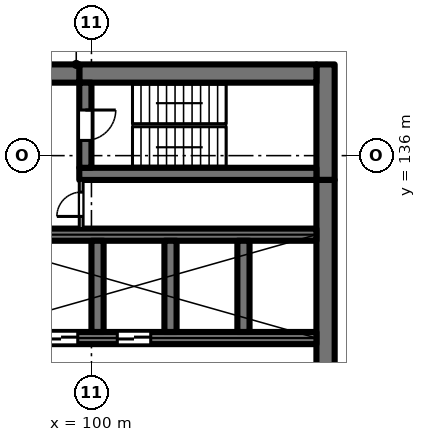
"""IFC4 building model, lengths in metres.
Left out: names, types, materials, properties, quantities, classifications, styles, units other than length and angle.
Written with IfcOpenShell. Run it as: python <this file> out.ifc"""

import sys

from ifc_helpers import new_model, si_unit, direction, frame, frame_2d, origin, place, context, subcontext, project, spatial, rectangle, extrude, element, fill, save


model = new_model("IFC4")
c1 = context("Model", 3, precision=1e-05, world=origin(), true_north=direction((0.0, 1.0)))
c2 = subcontext(c1, "Body", "Model", "MODEL_VIEW")
j1 = project(units=[si_unit("LENGTHUNIT", "METRE"), si_unit("PLANEANGLEUNIT", "RADIAN")], contexts=[c1])
p1 = place(None, origin())
s1 = spatial("IfcSite", under=j1, at=p1, CompositionType="ELEMENT")
p2 = place(p1, origin())
s2 = spatial("IfcBuilding", under=s1, at=p2, CompositionType="ELEMENT")
p3 = place(p2, frame((0.0, 0.0, 43.5)))
s3 = spatial("IfcBuildingStorey", under=s2, at=p3, CompositionType="ELEMENT", Elevation=43.5)
p4 = place(p3, frame((107.7, 139.0, 0.0), z_axis=(0.0, 0.0, 1.0), x_axis=(0.0, -1.0, 0.0)))
e1 = element("IfcWall", 1, at=p4, inside=s3, PredefinedType="SHEAR", context=c2, shape_type="SweptSolid", body=[
    extrude(rectangle(XDim=3.8, YDim=0.6, at=frame_2d((1.9, 0.0))), origin(), (0.0, 0.0, 1.0), 4.0),
])
p5 = place(p3, frame((107.7, 135.2, 0.0), z_axis=(0.0, 0.0, 1.0), x_axis=(0.0, -1.0, 0.0)))
e2 = element("IfcWall", 2, at=p5, inside=s3, PredefinedType="SHEAR", context=c2, shape_type="SweptSolid", body=[
    extrude(rectangle(XDim=14.4, YDim=0.6, at=frame_2d((7.2, 0.0))), origin(), (0.0, 0.0, 1.0), 4.0),
])
p6 = place(p3, frame((107.4, 138.7, 0.0), z_axis=(0.0, 0.0, 1.0), x_axis=(-1.0, 0.0, 0.0)))
e3 = element("IfcWall", 3, at=p6, inside=s3, PredefinedType="SHEAR", context=c2, shape_type="SweptSolid", body=[
    extrude(rectangle(XDim=7.8, YDim=0.6, at=frame_2d((3.9, 0.0))), origin(), (0.0, 0.0, 1.0), 4.0),
])
p7 = place(p3, frame((99.6, 138.7, 0.0), z_axis=(0.0, 0.0, 1.0), x_axis=(-1.0, 0.0, 0.0)))
e4 = element("IfcWall", 4, at=p7, inside=s3, PredefinedType="SHEAR", context=c2, shape_type="SweptSolid", body=[
    extrude(rectangle(XDim=8.9, YDim=0.6, at=frame_2d((4.45, 0.0))), origin(), (0.0, 0.0, 1.0), 4.0),
])
p8 = place(p3, frame((107.4, 135.4, 0.0), z_axis=(0.0, 0.0, 1.0), x_axis=(-1.0, 0.0, 0.0)))
e5 = element("IfcWall", 5, at=p8, inside=s3, PredefinedType="SHEAR", context=c2, shape_type="SweptSolid", body=[
    extrude(rectangle(XDim=7.8, YDim=0.4, at=frame_2d((3.9, 0.0))), origin(), (0.0, 0.0, 1.0), 4.0),
])
p9 = place(p3, frame((99.8, 138.4, 0.0), z_axis=(0.0, 0.0, 1.0), x_axis=(0.0, -1.0, 0.0)))
e6 = element("IfcWall", 6, at=p9, inside=s3, PredefinedType="SHEAR", context=c2, shape_type="SweptSolid", body=[
    extrude(rectangle(XDim=2.8, YDim=0.4, at=frame_2d((1.4, 0.0))), origin(), (0.0, 0.0, 1.0), 4.0),
])
p10 = place(p9, frame((0.9, 0.0, 0.0)))
e7 = element("IfcOpeningElement", 7, at=p10, cuts=e6, PredefinedType="OPENING", context=c2, shape_type="SweptSolid", body=[
    extrude(rectangle(XDim=1.0, YDim=2.1, at=frame_2d((0.5, 1.05))), frame((0.0, 0.21, 0.0), z_axis=(0.0, -1.0, 0.0), x_axis=(1.0, 0.0, 0.0)), (0.0, 0.0, 1.0), 0.42),
])
p11 = place(p3, frame((107.4, 130.0, 0.0), z_axis=(0.0, 0.0, 1.0), x_axis=(-1.0, 0.0, 0.0)))
e8 = element("IfcWall", 8, at=p11, inside=s3, PredefinedType="SHEAR", context=c2, shape_type="SweptSolid", body=[
    extrude(rectangle(XDim=12.2, YDim=0.4, at=frame_2d((6.1, 0.0))), origin(), (0.0, 0.0, 1.0), 4.0),
])
p12 = place(p11, frame((5.45, 0.0, 0.0)))
e9 = element("IfcOpeningElement", 9, at=p12, cuts=e8, PredefinedType="OPENING", context=c2, shape_type="SweptSolid", body=[
    extrude(rectangle(XDim=1.1, YDim=2.1, at=frame_2d((0.55, 1.05))), frame((0.0, 0.21, 0.0), z_axis=(0.0, -1.0, 0.0), x_axis=(1.0, 0.0, 0.0)), (0.0, 0.0, 1.0), 0.42),
])
p13 = place(p11, frame((7.85, 0.0, 0.0)))
e10 = element("IfcOpeningElement", 10, at=p13, cuts=e8, PredefinedType="OPENING", context=c2, shape_type="SweptSolid", body=[
    extrude(rectangle(XDim=1.1, YDim=2.1, at=frame_2d((0.55, 1.05))), frame((0.0, 0.21, 0.0), z_axis=(0.0, -1.0, 0.0), x_axis=(1.0, 0.0, 0.0)), (0.0, 0.0, 1.0), 0.42),
])
p14 = place(p3, frame((107.4, 133.4, 0.0), z_axis=(0.0, 0.0, 1.0), x_axis=(-1.0, 0.0, 0.0)))
e11 = element("IfcWall", 11, at=p14, inside=s3, PredefinedType="SHEAR", context=c2, shape_type="SweptSolid", body=[
    extrude(rectangle(XDim=12.2, YDim=0.4, at=frame_2d((6.1, 0.0))), origin(), (0.0, 0.0, 1.0), 4.0),
])
p15 = place(p14, frame((10.3, 0.0, 0.0)))
e12 = element("IfcOpeningElement", 12, at=p15, cuts=e11, PredefinedType="OPENING", context=c2, shape_type="SweptSolid", body=[
    extrude(rectangle(XDim=1.1, YDim=2.1, at=frame_2d((0.55, 1.05))), frame((0.0, 0.21, 0.0), z_axis=(0.0, -1.0, 0.0), x_axis=(1.0, 0.0, 0.0)), (0.0, 0.0, 1.0), 0.42),
])
for number, where, z_axis, x_axis in (
    (13, (105.0, 133.2, 0.0), (0.0, 0.0, 1.0), (0.0, -1.0, 0.0)),
    (14, (102.6, 133.2, 0.0), (0.0, 0.0, 1.0), (0.0, -1.0, 0.0)),
    (15, (100.2, 133.2, 0.0), (0.0, 0.0, 1.0), (0.0, -1.0, 0.0)),
):
    element("IfcWall", number, at=place(p3, frame(where, z_axis=z_axis, x_axis=x_axis)), inside=s3, PredefinedType="SHEAR", context=c2, shape_type="SweptSolid", body=[
        extrude(rectangle(XDim=3.0, YDim=0.4, at=frame_2d((1.5, 0.0))), origin(), (0.0, 0.0, 1.0), 4.0),
    ])
p16 = place(p3, frame((99.663, 133.6, 0.0), z_axis=(0.0, 0.0, 1.0), x_axis=(0.0, 1.0, 0.0)))
e16 = element("IfcWall", 16, at=p16, inside=s3, PredefinedType="PARTITIONING", context=c2, shape_type="SweptSolid", body=[
    extrude(rectangle(XDim=1.6, YDim=0.125, at=frame_2d((0.8, 0.0))), origin(), (0.0, 0.0, 1.0), 3.625),
])
p17 = place(p16, frame((0.4, 0.0, 0.0)))
e17 = element("IfcOpeningElement", 17, at=p17, cuts=e16, PredefinedType="OPENING", context=c2, shape_type="SweptSolid", body=[
    extrude(rectangle(XDim=0.8, YDim=2.1, at=frame_2d((0.4, 1.05))), frame((0.0, 0.073, 0.0), z_axis=(0.0, -1.0, 0.0), x_axis=(1.0, 0.0, 0.0)), (0.0, 0.0, 1.0), 0.145),
])
p18 = place(p12, origin())
e18 = element("IfcDoor", 18, at=p18, inside=s3, OperationType="DOUBLE_DOOR_SLIDING", PredefinedType="DOOR", context=c2, shape_type="SweptSolid", body=[
    extrude(rectangle(XDim=1.1, YDim=2.1, at=frame_2d((0.55, 1.05))), frame((0.0, 0.025, 0.0), z_axis=(0.0, -1.0, 0.0), x_axis=(1.0, 0.0, 0.0)), (0.0, 0.0, 1.0), 0.05),
])
fill(e9, e18)
p19 = place(p13, origin())
e19 = element("IfcDoor", 19, at=p19, inside=s3, OperationType="DOUBLE_DOOR_SLIDING", PredefinedType="DOOR", context=c2, shape_type="SweptSolid", body=[
    extrude(rectangle(XDim=1.1, YDim=2.1, at=frame_2d((0.55, 1.05))), frame((0.0, 0.025, 0.0), z_axis=(0.0, -1.0, 0.0), x_axis=(1.0, 0.0, 0.0)), (0.0, 0.0, 1.0), 0.05),
])
fill(e10, e19)
p20 = place(p10, origin())
e20 = element("IfcDoor", 20, at=p20, inside=s3, OperationType="SINGLE_SWING_RIGHT", PredefinedType="DOOR", context=c2, shape_type="SweptSolid", body=[
    extrude(rectangle(XDim=1.0, YDim=2.1, at=frame_2d((0.5, 1.05))), frame((0.0, 0.025, 0.0), z_axis=(0.0, -1.0, 0.0), x_axis=(1.0, 0.0, 0.0)), (0.0, 0.0, 1.0), 0.05),
])
fill(e7, e20)
p21 = place(p17, origin())
e21 = element("IfcDoor", 21, at=p21, inside=s3, OperationType="SINGLE_SWING_LEFT", PredefinedType="DOOR", context=c2, shape_type="SweptSolid", body=[
    extrude(rectangle(XDim=0.8, YDim=2.1, at=frame_2d((0.4, 1.05))), frame((0.0, 0.025, 0.0), z_axis=(0.0, -1.0, 0.0), x_axis=(1.0, 0.0, 0.0)), (0.0, 0.0, 1.0), 0.05),
])
fill(e17, e21)
save(model, sys.argv[1])
